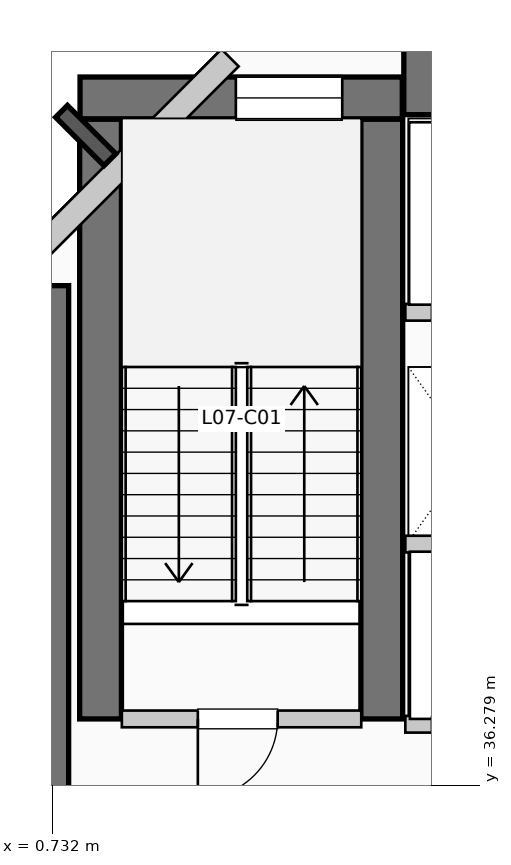
"""IFC4 building model, lengths in metres.
Left out: names, types, materials, properties, quantities, classifications, styles, units other than length and angle.
Written with IfcOpenShell. Run it as: python <this file> out.ifc"""

import sys

from ifc_helpers import new_model, si_unit, direction, frame, frame_2d, origin, place, context, subcontext, project, spatial, rectangle, extrude, element, fill, save


model = new_model("IFC4")
c1 = context("Model", 3, precision=1e-05, world=origin(), true_north=direction((0.0, 1.0)))
c2 = subcontext(c1, "Body", "Model", "MODEL_VIEW")
j1 = project(units=[si_unit("LENGTHUNIT", "METRE"), si_unit("PLANEANGLEUNIT", "RADIAN")], contexts=[c1])
p1 = place(None, origin())
s1 = spatial("IfcSite", under=j1, at=p1, CompositionType="ELEMENT")
p2 = place(p1, origin())
s2 = spatial("IfcBuilding", under=s1, at=p2, CompositionType="ELEMENT")
p3 = place(p2, frame((0.0, 0.0, 34.32)))
s3 = spatial("IfcBuildingStorey", under=s2, at=p3, CompositionType="ELEMENT", Elevation=34.32)
p4 = place(p3, frame((5.36, 45.55, 0.0), z_axis=(0.0, 0.0, 1.0), x_axis=(1.0, 0.0, 0.0)))
e1 = element("IfcWall", 1, at=p4, inside=s3, PredefinedType="SHEAR", context=c2, shape_type="SweptSolid", body=[
    extrude(rectangle(XDim=13.98, YDim=0.9, at=frame_2d((6.99, 0.0))), origin(), (0.0, 0.0, 1.0), 3.96),
])
p5 = place(p3, frame((0.5, 34.95, 0.0), z_axis=(0.0, 0.0, 1.0), x_axis=(0.0, 1.0, 0.0)))
e2 = element("IfcWall", 2, at=p5, inside=s3, PredefinedType="SHEAR", context=c2, shape_type="SweptSolid", body=[
    extrude(rectangle(XDim=7.9, YDim=0.9, at=frame_2d((3.95, 0.0))), origin(), (0.0, 0.0, 1.0), 3.96),
])
for number, where, z_axis, x_axis in (
    (3, (1.37, 37.15, 0.0), (0.0, 0.0, 1.0), (0.0, 1.0, 0.0)),
    (4, (5.07, 37.15, 0.0), (0.0, 0.0, 1.0), (0.0, 1.0, 0.0)),
):
    element("IfcWall", number, at=place(p3, frame(where, z_axis=z_axis, x_axis=x_axis)), inside=s3, PredefinedType="SHEAR", context=c2, shape_type="SweptSolid", body=[
        extrude(rectangle(XDim=7.89, YDim=0.55, at=frame_2d((3.945, 0.0))), origin(), (0.0, 0.0, 1.0), 3.96),
    ])
p6 = place(p3, frame((1.1, 45.32, 0.0), z_axis=(0.0, 0.0, 1.0), x_axis=(1.0, 0.0, 0.0)))
e5 = element("IfcWall", 5, at=p6, inside=s3, PredefinedType="SHEAR", context=c2, shape_type="SweptSolid", body=[
    extrude(rectangle(XDim=4.24, YDim=0.55, at=frame_2d((2.12, 0.0))), origin(), (0.0, 0.0, 1.0), 3.96),
])
p7 = place(p6, frame((2.05, 0.0, 1.05)))
e6 = element("IfcOpeningElement", 6, at=p7, cuts=e5, PredefinedType="OPENING", context=c2, shape_type="SweptSolid", body=[
    extrude(rectangle(XDim=1.4, YDim=1.8, at=frame_2d((0.7, 0.9))), frame((0.0, 0.285, 0.0), z_axis=(0.0, -1.0, 0.0), x_axis=(1.0, 0.0, 0.0)), (0.0, 0.0, 1.0), 0.57),
])
p8 = place(p3, frame((3.074, 45.848, 0.0), z_axis=(0.0, 0.0, 1.0), x_axis=(-0.707106781187, -0.707106781187, 0.0)))
e7 = element("IfcWall", 7, at=p8, inside=s3, PredefinedType="SOLIDWALL", context=c2, shape_type="SweptSolid", body=[
    extrude(rectangle(XDim=4.133, YDim=0.32, at=frame_2d((2.066, 0.0))), origin(), (0.0, 0.0, 1.0), 3.71),
])
p9 = place(p3, frame((1.65, 37.15, 0.0), z_axis=(0.0, 0.0, 1.0), x_axis=(1.0, 0.0, 0.0)))
e8 = element("IfcWall", 8, at=p9, inside=s3, PredefinedType="PARTITIONING", context=c2, shape_type="SweptSolid", body=[
    extrude(rectangle(XDim=3.15, YDim=0.22, at=frame_2d((1.575, 0.0))), origin(), (0.0, 0.0, 1.0), 3.71),
])
p10 = place(p9, frame((2.05, 0.0, 0.0), z_axis=(0.0, 0.0, 1.0), x_axis=(-1.0, 0.0, 0.0)))
e9 = element("IfcOpeningElement", 9, at=p10, cuts=e8, PredefinedType="OPENING", context=c2, shape_type="SweptSolid", body=[
    extrude(rectangle(XDim=1.05, YDim=2.15, at=frame_2d((0.525, 1.075))), frame((0.0, 0.12, 0.0), z_axis=(0.0, -1.0, 0.0), x_axis=(1.0, 0.0, 0.0)), (0.0, 0.0, 1.0), 0.24),
])
p11 = place(p3, frame((5.38, 37.08, 0.0), z_axis=(0.0, 0.0, 1.0), x_axis=(1.0, 0.0, 0.0)))
e10 = element("IfcWall", 10, at=p11, inside=s3, PredefinedType="PARTITIONING", context=c2, shape_type="SweptSolid", body=[
    extrude(rectangle(XDim=3.46, YDim=0.22, at=frame_2d((1.73, 0.0))), origin(), (0.0, 0.0, 1.0), 3.71),
])
p12 = place(p11, frame((1.55, 0.0, 0.0), z_axis=(0.0, 0.0, 1.0), x_axis=(-1.0, 0.0, 0.0)))
e11 = element("IfcOpeningElement", 11, at=p12, cuts=e10, PredefinedType="OPENING", context=c2, shape_type="SweptSolid", body=[
    extrude(rectangle(XDim=1.2, YDim=2.2, at=frame_2d((0.6, 1.1))), frame((0.0, 0.12, 0.0), z_axis=(0.0, -1.0, 0.0), x_axis=(1.0, 0.0, 0.0)), (0.0, 0.0, 1.0), 0.24),
])
p13 = place(p11, frame((3.22, 0.0, 0.0), z_axis=(0.0, 0.0, 1.0), x_axis=(-1.0, 0.0, 0.0)))
e12 = element("IfcOpeningElement", 12, at=p13, cuts=e10, PredefinedType="OPENING", context=c2, shape_type="SweptSolid", body=[
    extrude(rectangle(XDim=1.2, YDim=2.2, at=frame_2d((0.6, 1.1))), frame((0.0, 0.12, 0.0), z_axis=(0.0, -1.0, 0.0), x_axis=(1.0, 0.0, 0.0)), (0.0, 0.0, 1.0), 0.24),
])
p14 = place(p3, frame((5.38, 39.45, 0.0), z_axis=(0.0, 0.0, 1.0), x_axis=(1.0, 0.0, 0.0)))
e13 = element("IfcWall", 13, at=p14, inside=s3, PredefinedType="PARTITIONING", context=c2, shape_type="SweptSolid", body=[
    extrude(rectangle(XDim=3.46, YDim=0.22, at=frame_2d((1.73, 0.0))), origin(), (0.0, 0.0, 1.0), 3.71),
])
p15 = place(p3, frame((5.38, 42.5, 0.0), z_axis=(0.0, 0.0, 1.0), x_axis=(1.0, 0.0, 0.0)))
e14 = element("IfcWall", 14, at=p15, inside=s3, PredefinedType="PARTITIONING", context=c2, shape_type="SweptSolid", body=[
    extrude(rectangle(XDim=3.77, YDim=0.22, at=frame_2d((1.885, 0.0))), origin(), (0.0, 0.0, 1.0), 3.71),
])
p16 = place(p15, frame((1.75, 0.0, 0.0), z_axis=(0.0, 0.0, 1.0), x_axis=(-1.0, 0.0, 0.0)))
e15 = element("IfcOpeningElement", 15, at=p16, cuts=e14, PredefinedType="OPENING", context=c2, shape_type="SweptSolid", body=[
    extrude(rectangle(XDim=1.4, YDim=2.2, at=frame_2d((0.7, 1.1))), frame((0.0, 0.12, 0.0), z_axis=(0.0, -1.0, 0.0), x_axis=(1.0, 0.0, 0.0)), (0.0, 0.0, 1.0), 0.24),
])
p17 = place(p15, frame((3.53, 0.0, 0.0), z_axis=(0.0, 0.0, 1.0), x_axis=(-1.0, 0.0, 0.0)))
e16 = element("IfcOpeningElement", 16, at=p17, cuts=e14, PredefinedType="OPENING", context=c2, shape_type="SweptSolid", body=[
    extrude(rectangle(XDim=1.4, YDim=2.2, at=frame_2d((0.7, 1.1))), frame((0.0, 0.12, 0.0), z_axis=(0.0, -1.0, 0.0), x_axis=(1.0, 0.0, 0.0)), (0.0, 0.0, 1.0), 0.24),
])
p18 = place(p7, origin())
e17 = element("IfcWindow", 17, at=p18, inside=s3, PartitioningType="SINGLE_PANEL", PredefinedType="WINDOW", context=c2, shape_type="SweptSolid", body=[
    extrude(rectangle(XDim=1.4, YDim=1.8, at=frame_2d((0.7, 0.9))), frame((0.0, 0.03, 0.0), z_axis=(0.0, -1.0, 0.0), x_axis=(1.0, 0.0, 0.0)), (0.0, 0.0, 1.0), 0.06),
])
fill(e6, e17)
p19 = place(p10, origin())
e18 = element("IfcDoor", 18, at=p19, inside=s3, OperationType="SINGLE_SWING_LEFT", PredefinedType="DOOR", context=c2, shape_type="SweptSolid", body=[
    extrude(rectangle(XDim=1.05, YDim=2.15, at=frame_2d((0.525, 1.075))), frame((0.0, 0.025, 0.0), z_axis=(0.0, -1.0, 0.0), x_axis=(1.0, 0.0, 0.0)), (0.0, 0.0, 1.0), 0.05),
])
fill(e9, e18)
save(model, sys.argv[1])
